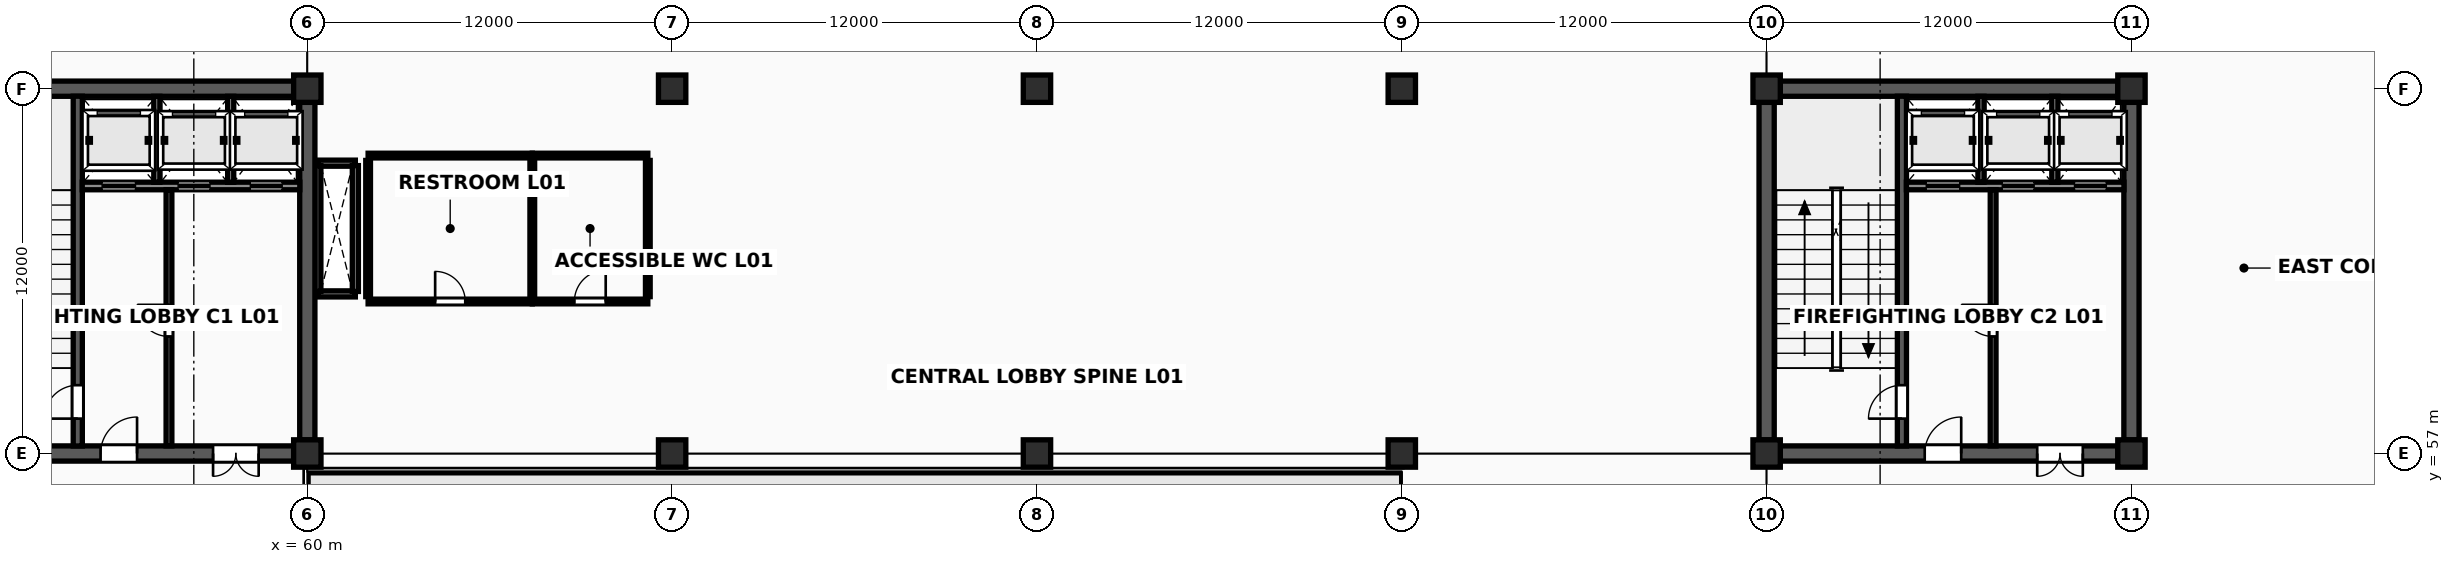
"""IFC4 building model, lengths in metres.
Left out: names, types, materials, properties, quantities, classifications, styles, units other than length and angle.
Written with IfcOpenShell. Run it as: python <this file> out.ifc"""

import sys

from ifc_helpers import new_model, si_unit, direction, frame, frame_2d, origin, origin_2d, place, context, subcontext, project, spatial, rectangle, extrude, element, fill, save


model = new_model("IFC4")
c1 = context("Model", 3, precision=1e-05, world=origin(), true_north=direction((0.0, 1.0)))
c2 = subcontext(c1, "Body", "Model", "MODEL_VIEW")
j1 = project(units=[si_unit("LENGTHUNIT", "METRE"), si_unit("PLANEANGLEUNIT", "RADIAN")], contexts=[c1])
p1 = place(None, origin())
s1 = spatial("IfcSite", under=j1, at=p1, CompositionType="ELEMENT")
p2 = place(p1, origin())
s2 = spatial("IfcBuilding", under=s1, at=p2, CompositionType="ELEMENT")
p3 = place(p2, frame((0.0, 0.0, 5.4)))
s3 = spatial("IfcBuildingStorey", under=s2, at=p3, CompositionType="ELEMENT", Elevation=5.4)
for number, where, z_axis, x_axis in (
    (1, (60.0, 57.0, 0.0), (0.0, 0.0, 1.0), (1.0, 0.0, 0.0)),
    (2, (60.0, 69.0, 0.0), (0.0, 0.0, 1.0), (1.0, 0.0, 0.0)),
    (3, (72.0, 57.0, 0.0), (0.0, 0.0, 1.0), (1.0, 0.0, 0.0)),
    (4, (72.0, 69.0, 0.0), (0.0, 0.0, 1.0), (1.0, 0.0, 0.0)),
    (5, (84.0, 57.0, 0.0), (0.0, 0.0, 1.0), (1.0, 0.0, 0.0)),
    (6, (84.0, 69.0, 0.0), (0.0, 0.0, 1.0), (1.0, 0.0, 0.0)),
    (7, (96.0, 57.0, 0.0), (0.0, 0.0, 1.0), (1.0, 0.0, 0.0)),
    (8, (96.0, 69.0, 0.0), (0.0, 0.0, 1.0), (1.0, 0.0, 0.0)),
    (9, (108.0, 57.0, 0.0), (0.0, 0.0, 1.0), (1.0, 0.0, 0.0)),
    (10, (108.0, 69.0, 0.0), (0.0, 0.0, 1.0), (1.0, 0.0, 0.0)),
    (11, (120.0, 57.0, 0.0), (0.0, 0.0, 1.0), (1.0, 0.0, 0.0)),
    (12, (120.0, 69.0, 0.0), (0.0, 0.0, 1.0), (1.0, 0.0, 0.0)),
):
    element("IfcColumn", number, at=place(p3, frame(where, z_axis=z_axis, x_axis=x_axis)), inside=s3, PredefinedType="COLUMN", context=c2, shape_type="SweptSolid", body=[
        extrude(rectangle(XDim=0.9, YDim=0.9, at=origin_2d()), origin(), (0.0, 0.0, 1.0), 4.2),
    ])
for number, where, z_axis, x_axis in (
    (13, (60.347, 62.25, 0.0), (0.0, 0.0, 1.0), (1.0, 0.0, 0.0)),
    (14, (60.347, 66.55, 0.0), (0.0, 0.0, 1.0), (1.0, 0.0, 0.0)),
):
    element("IfcWall", number, at=place(p3, frame(where, z_axis=z_axis, x_axis=x_axis)), inside=s3, PredefinedType="SOLIDWALL", context=c2, shape_type="SweptSolid", body=[
        extrude(rectangle(XDim=1.233, YDim=0.2, at=frame_2d((0.617, 0.0))), origin(), (0.0, 0.0, 1.0), 4.043),
    ])
for number, where, z_axis, x_axis in (
    (15, (60.347, 62.33, 0.0), (0.0, 0.0, 1.0), (0.0, 1.0, 0.0)),
    (16, (61.58, 62.33, 0.0), (0.0, 0.0, 1.0), (0.0, 1.0, 0.0)),
):
    element("IfcWall", number, at=place(p3, frame(where, z_axis=z_axis, x_axis=x_axis)), inside=s3, PredefinedType="SOLIDWALL", context=c2, shape_type="SweptSolid", body=[
        extrude(rectangle(XDim=4.14, YDim=0.2, at=frame_2d((2.07, 0.0))), origin(), (0.0, 0.0, 1.0), 4.043),
    ])
p4 = place(p3, frame((48.447, 57.0, 0.0), z_axis=(0.0, 0.0, 1.0), x_axis=(1.0, 0.0, 0.0)))
e17 = element("IfcWall", 17, at=p4, inside=s3, PredefinedType="SHEAR", context=c2, shape_type="SweptSolid", body=[
    extrude(rectangle(XDim=11.106, YDim=0.5, at=frame_2d((5.553, 0.0))), origin(), (0.0, 0.0, 1.0), 4.043),
])
p5 = place(p4, frame((4.753, 0.0, 0.0)))
e18 = element("IfcOpeningElement", 18, at=p5, cuts=e17, PredefinedType="OPENING", context=c2, shape_type="SweptSolid", body=[
    extrude(rectangle(XDim=1.2, YDim=2.2, at=frame_2d((0.6, 1.1))), frame((0.0, 0.265, 0.0), z_axis=(0.0, -1.0, 0.0), x_axis=(1.0, 0.0, 0.0)), (0.0, 0.0, 1.0), 0.53),
])
p6 = place(p4, frame((8.453, 0.0, 0.0)))
e19 = element("IfcOpeningElement", 19, at=p6, cuts=e17, PredefinedType="OPENING", context=c2, shape_type="SweptSolid", body=[
    extrude(rectangle(XDim=1.5, YDim=2.25, at=frame_2d((0.75, 1.125))), frame((0.0, 0.265, 0.0), z_axis=(0.0, -1.0, 0.0), x_axis=(1.0, 0.0, 0.0)), (0.0, 0.0, 1.0), 0.53),
])
for number, where, z_axis, x_axis in (
    (20, (48.447, 69.0, 0.0), (0.0, 0.0, 1.0), (1.0, 0.0, 0.0)),
    (21, (60.0, 57.447, 0.0), (0.0, 0.0, 1.0), (0.0, 1.0, 0.0)),
):
    element("IfcWall", number, at=place(p3, frame(where, z_axis=z_axis, x_axis=x_axis)), inside=s3, PredefinedType="SHEAR", context=c2, shape_type="SweptSolid", body=[
        extrude(rectangle(XDim=11.106, YDim=0.5, at=frame_2d((5.553, 0.0))), origin(), (0.0, 0.0, 1.0), 4.043),
    ])
p7 = place(p3, frame((52.45, 57.247, 0.0), z_axis=(0.0, 0.0, 1.0), x_axis=(0.0, 1.0, 0.0)))
e22 = element("IfcWall", 22, at=p7, inside=s3, PredefinedType="SHEAR", context=c2, shape_type="SweptSolid", body=[
    extrude(rectangle(XDim=11.506, YDim=0.3, at=frame_2d((5.753, 0.0))), origin(), (0.0, 0.0, 1.0), 4.043),
])
p8 = place(p7, frame((0.9, 0.0, 0.0)))
e23 = element("IfcOpeningElement", 23, at=p8, cuts=e22, PredefinedType="OPENING", context=c2, shape_type="SweptSolid", body=[
    extrude(rectangle(XDim=1.1, YDim=2.2, at=frame_2d((0.55, 1.1))), frame((0.0, 0.165, 0.0), z_axis=(0.0, -1.0, 0.0), x_axis=(1.0, 0.0, 0.0)), (0.0, 0.0, 1.0), 0.33),
])
p9 = place(p3, frame((52.597, 65.8, 0.0), z_axis=(0.0, 0.0, 1.0), x_axis=(1.0, 0.0, 0.0)))
e24 = element("IfcWall", 24, at=p9, inside=s3, PredefinedType="SOLIDWALL", context=c2, shape_type="SweptSolid", body=[
    extrude(rectangle(XDim=7.156, YDim=0.25, at=frame_2d((3.578, 0.0))), origin(), (0.0, 0.0, 1.0), 4.043),
])
p10 = place(p9, frame((0.653, 0.0, 0.0)))
e25 = element("IfcOpeningElement", 25, at=p10, cuts=e24, PredefinedType="OPENING", context=c2, shape_type="SweptSolid", body=[
    extrude(rectangle(XDim=1.1, YDim=2.24, at=frame_2d((0.55, 1.12))), frame((0.0, 0.14, 0.0), z_axis=(0.0, -1.0, 0.0), x_axis=(1.0, 0.0, 0.0)), (0.0, 0.0, 1.0), 0.28),
])
p11 = place(p9, frame((3.153, 0.0, 0.0)))
e26 = element("IfcOpeningElement", 26, at=p11, cuts=e24, PredefinedType="OPENING", context=c2, shape_type="SweptSolid", body=[
    extrude(rectangle(XDim=1.05, YDim=2.2, at=frame_2d((0.525, 1.1))), frame((0.0, 0.14, 0.0), z_axis=(0.0, -1.0, 0.0), x_axis=(1.0, 0.0, 0.0)), (0.0, 0.0, 1.0), 0.28),
])
p12 = place(p9, frame((5.528, 0.0, 0.0)))
e27 = element("IfcOpeningElement", 27, at=p12, cuts=e24, PredefinedType="OPENING", context=c2, shape_type="SweptSolid", body=[
    extrude(rectangle(XDim=1.05, YDim=2.2, at=frame_2d((0.525, 1.1))), frame((0.0, 0.14, 0.0), z_axis=(0.0, -1.0, 0.0), x_axis=(1.0, 0.0, 0.0)), (0.0, 0.0, 1.0), 0.28),
])
for number, where, z_axis, x_axis in (
    (28, (55.05, 65.92, 0.0), (0.0, 0.0, 1.0), (0.0, 1.0, 0.0)),
    (29, (57.48, 65.92, 0.0), (0.0, 0.0, 1.0), (0.0, 1.0, 0.0)),
):
    element("IfcWall", number, at=place(p3, frame(where, z_axis=z_axis, x_axis=x_axis)), inside=s3, PredefinedType="SOLIDWALL", context=c2, shape_type="SweptSolid", body=[
        extrude(rectangle(XDim=2.83, YDim=0.2, at=frame_2d((1.415, 0.0))), origin(), (0.0, 0.0, 1.0), 4.033),
    ])
p13 = place(p3, frame((55.45, 57.25, 0.0), z_axis=(0.0, 0.0, 1.0), x_axis=(0.0, 1.0, 0.0)))
e30 = element("IfcWall", 30, at=p13, inside=s3, PredefinedType="SOLIDWALL", context=c2, shape_type="SweptSolid", body=[
    extrude(rectangle(XDim=8.43, YDim=0.19, at=frame_2d((4.215, 0.0))), origin(), (0.0, 0.0, 1.0), 4.033),
])
p14 = place(p13, frame((3.6, 0.0, 0.0)))
e31 = element("IfcOpeningElement", 31, at=p14, cuts=e30, PredefinedType="OPENING", context=c2, shape_type="SweptSolid", body=[
    extrude(rectangle(XDim=1.04, YDim=2.18, at=frame_2d((0.52, 1.09))), frame((0.0, 0.11, 0.0), z_axis=(0.0, -1.0, 0.0), x_axis=(1.0, 0.0, 0.0)), (0.0, 0.0, 1.0), 0.22),
])
p15 = place(p3, frame((108.447, 57.0, 0.0), z_axis=(0.0, 0.0, 1.0), x_axis=(1.0, 0.0, 0.0)))
e32 = element("IfcWall", 32, at=p15, inside=s3, PredefinedType="SHEAR", context=c2, shape_type="SweptSolid", body=[
    extrude(rectangle(XDim=11.106, YDim=0.5, at=frame_2d((5.553, 0.0))), origin(), (0.0, 0.0, 1.0), 4.043),
])
p16 = place(p15, frame((4.753, 0.0, 0.0)))
e33 = element("IfcOpeningElement", 33, at=p16, cuts=e32, PredefinedType="OPENING", context=c2, shape_type="SweptSolid", body=[
    extrude(rectangle(XDim=1.2, YDim=2.2, at=frame_2d((0.6, 1.1))), frame((0.0, 0.265, 0.0), z_axis=(0.0, -1.0, 0.0), x_axis=(1.0, 0.0, 0.0)), (0.0, 0.0, 1.0), 0.53),
])
p17 = place(p15, frame((8.453, 0.0, 0.0)))
e34 = element("IfcOpeningElement", 34, at=p17, cuts=e32, PredefinedType="OPENING", context=c2, shape_type="SweptSolid", body=[
    extrude(rectangle(XDim=1.5, YDim=2.25, at=frame_2d((0.75, 1.125))), frame((0.0, 0.265, 0.0), z_axis=(0.0, -1.0, 0.0), x_axis=(1.0, 0.0, 0.0)), (0.0, 0.0, 1.0), 0.53),
])
for number, where, z_axis, x_axis in (
    (35, (108.447, 69.0, 0.0), (0.0, 0.0, 1.0), (1.0, 0.0, 0.0)),
    (36, (108.0, 57.447, 0.0), (0.0, 0.0, 1.0), (0.0, 1.0, 0.0)),
    (37, (120.0, 57.447, 0.0), (0.0, 0.0, 1.0), (0.0, 1.0, 0.0)),
):
    element("IfcWall", number, at=place(p3, frame(where, z_axis=z_axis, x_axis=x_axis)), inside=s3, PredefinedType="SHEAR", context=c2, shape_type="SweptSolid", body=[
        extrude(rectangle(XDim=11.106, YDim=0.5, at=frame_2d((5.553, 0.0))), origin(), (0.0, 0.0, 1.0), 4.043),
    ])
p18 = place(p3, frame((112.45, 57.247, 0.0), z_axis=(0.0, 0.0, 1.0), x_axis=(0.0, 1.0, 0.0)))
e38 = element("IfcWall", 38, at=p18, inside=s3, PredefinedType="SHEAR", context=c2, shape_type="SweptSolid", body=[
    extrude(rectangle(XDim=11.506, YDim=0.3, at=frame_2d((5.753, 0.0))), origin(), (0.0, 0.0, 1.0), 4.043),
])
p19 = place(p18, frame((0.9, 0.0, 0.0)))
e39 = element("IfcOpeningElement", 39, at=p19, cuts=e38, PredefinedType="OPENING", context=c2, shape_type="SweptSolid", body=[
    extrude(rectangle(XDim=1.1, YDim=2.2, at=frame_2d((0.55, 1.1))), frame((0.0, 0.165, 0.0), z_axis=(0.0, -1.0, 0.0), x_axis=(1.0, 0.0, 0.0)), (0.0, 0.0, 1.0), 0.33),
])
p20 = place(p3, frame((112.597, 65.8, 0.0), z_axis=(0.0, 0.0, 1.0), x_axis=(1.0, 0.0, 0.0)))
e40 = element("IfcWall", 40, at=p20, inside=s3, PredefinedType="SOLIDWALL", context=c2, shape_type="SweptSolid", body=[
    extrude(rectangle(XDim=7.156, YDim=0.25, at=frame_2d((3.578, 0.0))), origin(), (0.0, 0.0, 1.0), 4.043),
])
p21 = place(p20, frame((0.653, 0.0, 0.0)))
e41 = element("IfcOpeningElement", 41, at=p21, cuts=e40, PredefinedType="OPENING", context=c2, shape_type="SweptSolid", body=[
    extrude(rectangle(XDim=1.1, YDim=2.24, at=frame_2d((0.55, 1.12))), frame((0.0, 0.14, 0.0), z_axis=(0.0, -1.0, 0.0), x_axis=(1.0, 0.0, 0.0)), (0.0, 0.0, 1.0), 0.28),
])
p22 = place(p20, frame((3.153, 0.0, 0.0)))
e42 = element("IfcOpeningElement", 42, at=p22, cuts=e40, PredefinedType="OPENING", context=c2, shape_type="SweptSolid", body=[
    extrude(rectangle(XDim=1.05, YDim=2.2, at=frame_2d((0.525, 1.1))), frame((0.0, 0.14, 0.0), z_axis=(0.0, -1.0, 0.0), x_axis=(1.0, 0.0, 0.0)), (0.0, 0.0, 1.0), 0.28),
])
p23 = place(p20, frame((5.528, 0.0, 0.0)))
e43 = element("IfcOpeningElement", 43, at=p23, cuts=e40, PredefinedType="OPENING", context=c2, shape_type="SweptSolid", body=[
    extrude(rectangle(XDim=1.05, YDim=2.2, at=frame_2d((0.525, 1.1))), frame((0.0, 0.14, 0.0), z_axis=(0.0, -1.0, 0.0), x_axis=(1.0, 0.0, 0.0)), (0.0, 0.0, 1.0), 0.28),
])
for number, where, z_axis, x_axis in (
    (44, (115.05, 65.92, 0.0), (0.0, 0.0, 1.0), (0.0, 1.0, 0.0)),
    (45, (117.48, 65.92, 0.0), (0.0, 0.0, 1.0), (0.0, 1.0, 0.0)),
):
    element("IfcWall", number, at=place(p3, frame(where, z_axis=z_axis, x_axis=x_axis)), inside=s3, PredefinedType="SOLIDWALL", context=c2, shape_type="SweptSolid", body=[
        extrude(rectangle(XDim=2.83, YDim=0.2, at=frame_2d((1.415, 0.0))), origin(), (0.0, 0.0, 1.0), 4.033),
    ])
p24 = place(p3, frame((115.45, 57.25, 0.0), z_axis=(0.0, 0.0, 1.0), x_axis=(0.0, 1.0, 0.0)))
e46 = element("IfcWall", 46, at=p24, inside=s3, PredefinedType="SOLIDWALL", context=c2, shape_type="SweptSolid", body=[
    extrude(rectangle(XDim=8.43, YDim=0.19, at=frame_2d((4.215, 0.0))), origin(), (0.0, 0.0, 1.0), 4.033),
])
p25 = place(p24, frame((3.6, 0.0, 0.0)))
e47 = element("IfcOpeningElement", 47, at=p25, cuts=e46, PredefinedType="OPENING", context=c2, shape_type="SweptSolid", body=[
    extrude(rectangle(XDim=1.04, YDim=2.18, at=frame_2d((0.52, 1.09))), frame((0.0, 0.11, 0.0), z_axis=(0.0, -1.0, 0.0), x_axis=(1.0, 0.0, 0.0)), (0.0, 0.0, 1.0), 0.22),
])
p26 = place(p3, frame((62.0, 62.0, 0.0), z_axis=(0.0, 0.0, 1.0), x_axis=(1.0, 0.0, 0.0)))
e48 = element("IfcWall", 48, at=p26, inside=s3, PredefinedType="PLUMBINGWALL", context=c2, shape_type="SweptSolid", body=[
    extrude(rectangle(XDim=5.4, YDim=0.155, at=frame_2d((2.7, 0.0))), origin(), (0.0, 0.0, 1.0), 2.75),
])
p27 = place(p26, frame((2.205, 0.0, 0.0)))
e49 = element("IfcOpeningElement", 49, at=p27, cuts=e48, PredefinedType="OPENING", context=c2, shape_type="SweptSolid", body=[
    extrude(rectangle(XDim=0.99, YDim=2.15, at=frame_2d((0.495, 1.075))), frame((0.0, 0.093, 0.0), z_axis=(0.0, -1.0, 0.0), x_axis=(1.0, 0.0, 0.0)), (0.0, 0.0, 1.0), 0.185),
])
p28 = place(p3, frame((62.0, 66.8, 0.0), z_axis=(0.0, 0.0, 1.0), x_axis=(1.0, 0.0, 0.0)))
e50 = element("IfcWall", 50, at=p28, inside=s3, PredefinedType="PLUMBINGWALL", context=c2, shape_type="SweptSolid", body=[
    extrude(rectangle(XDim=5.4, YDim=0.155, at=frame_2d((2.7, 0.0))), origin(), (0.0, 0.0, 1.0), 2.75),
])
for number, where, z_axis, x_axis in (
    (51, (62.0, 62.16, 0.0), (0.0, 0.0, 1.0), (0.0, 1.0, 0.0)),
    (52, (67.4, 62.16, 0.0), (0.0, 0.0, 1.0), (0.0, 1.0, 0.0)),
):
    element("IfcWall", number, at=place(p3, frame(where, z_axis=z_axis, x_axis=x_axis)), inside=s3, PredefinedType="PLUMBINGWALL", context=c2, shape_type="SweptSolid", body=[
        extrude(rectangle(XDim=4.48, YDim=0.155, at=frame_2d((2.24, 0.0))), origin(), (0.0, 0.0, 1.0), 2.75),
    ])
p29 = place(p3, frame((67.4, 62.0, 0.0), z_axis=(0.0, 0.0, 1.0), x_axis=(1.0, 0.0, 0.0)))
e53 = element("IfcWall", 53, at=p29, inside=s3, PredefinedType="PLUMBINGWALL", context=c2, shape_type="SweptSolid", body=[
    extrude(rectangle(XDim=3.8, YDim=0.155, at=frame_2d((1.9, 0.0))), origin(), (0.0, 0.0, 1.0), 2.75),
])
p30 = place(p29, frame((1.385, 0.0, 0.0)))
e54 = element("IfcOpeningElement", 54, at=p30, cuts=e53, PredefinedType="OPENING", context=c2, shape_type="SweptSolid", body=[
    extrude(rectangle(XDim=1.03, YDim=2.17, at=frame_2d((0.515, 1.085))), frame((0.0, 0.093, 0.0), z_axis=(0.0, -1.0, 0.0), x_axis=(1.0, 0.0, 0.0)), (0.0, 0.0, 1.0), 0.185),
])
p31 = place(p3, frame((67.4, 66.8, 0.0), z_axis=(0.0, 0.0, 1.0), x_axis=(1.0, 0.0, 0.0)))
e55 = element("IfcWall", 55, at=p31, inside=s3, PredefinedType="PLUMBINGWALL", context=c2, shape_type="SweptSolid", body=[
    extrude(rectangle(XDim=3.8, YDim=0.155, at=frame_2d((1.9, 0.0))), origin(), (0.0, 0.0, 1.0), 2.75),
])
p32 = place(p3, frame((71.2, 62.16, 0.0), z_axis=(0.0, 0.0, 1.0), x_axis=(0.0, 1.0, 0.0)))
e56 = element("IfcWall", 56, at=p32, inside=s3, PredefinedType="PLUMBINGWALL", context=c2, shape_type="SweptSolid", body=[
    extrude(rectangle(XDim=4.48, YDim=0.155, at=frame_2d((2.24, 0.0))), origin(), (0.0, 0.0, 1.0), 2.75),
])
p33 = place(p8, origin())
e57 = element("IfcDoor", 57, at=p33, inside=s3, OperationType="SINGLE_SWING_LEFT", PredefinedType="DOOR", context=c2, shape_type="SweptSolid", body=[
    extrude(rectangle(XDim=1.1, YDim=2.2, at=frame_2d((0.55, 1.1))), frame((0.0, 0.025, 0.0), z_axis=(0.0, -1.0, 0.0), x_axis=(1.0, 0.0, 0.0)), (0.0, 0.0, 1.0), 0.05),
])
fill(e23, e57)
p34 = place(p14, origin())
e58 = element("IfcDoor", 58, at=p34, inside=s3, OperationType="SINGLE_SWING_RIGHT", PredefinedType="DOOR", context=c2, shape_type="SweptSolid", body=[
    extrude(rectangle(XDim=1.04, YDim=2.18, at=frame_2d((0.52, 1.09))), frame((0.0, 0.025, 0.0), z_axis=(0.0, -1.0, 0.0), x_axis=(1.0, 0.0, 0.0)), (0.0, 0.0, 1.0), 0.05),
])
fill(e31, e58)
p35 = place(p5, origin())
e59 = element("IfcDoor", 59, at=p35, inside=s3, OperationType="SINGLE_SWING_RIGHT", PredefinedType="DOOR", context=c2, shape_type="SweptSolid", body=[
    extrude(rectangle(XDim=1.2, YDim=2.2, at=frame_2d((0.6, 1.1))), frame((0.0, 0.025, 0.0), z_axis=(0.0, -1.0, 0.0), x_axis=(1.0, 0.0, 0.0)), (0.0, 0.0, 1.0), 0.05),
])
fill(e18, e59)
p36 = place(p6, origin())
e60 = element("IfcDoor", 60, at=p36, inside=s3, OperationType="DOUBLE_DOOR_SINGLE_SWING", PredefinedType="DOOR", context=c2, shape_type="SweptSolid", body=[
    extrude(rectangle(XDim=1.5, YDim=2.25, at=frame_2d((0.75, 1.125))), frame((0.0, 0.025, 0.0), z_axis=(0.0, -1.0, 0.0), x_axis=(1.0, 0.0, 0.0)), (0.0, 0.0, 1.0), 0.05),
])
fill(e19, e60)
p37 = place(p10, origin())
e61 = element("IfcDoor", 61, at=p37, inside=s3, OperationType="SLIDING_TO_LEFT", PredefinedType="USERDEFINED", context=c2, shape_type="SweptSolid", body=[
    extrude(rectangle(XDim=1.1, YDim=2.24, at=frame_2d((0.55, 1.12))), frame((0.0, 0.025, 0.0), z_axis=(0.0, -1.0, 0.0), x_axis=(1.0, 0.0, 0.0)), (0.0, 0.0, 1.0), 0.05),
])
fill(e25, e61)
p38 = place(p11, origin())
e62 = element("IfcDoor", 62, at=p38, inside=s3, OperationType="SLIDING_TO_LEFT", PredefinedType="USERDEFINED", context=c2, shape_type="SweptSolid", body=[
    extrude(rectangle(XDim=1.05, YDim=2.2, at=frame_2d((0.525, 1.1))), frame((0.0, 0.025, 0.0), z_axis=(0.0, -1.0, 0.0), x_axis=(1.0, 0.0, 0.0)), (0.0, 0.0, 1.0), 0.05),
])
fill(e26, e62)
p39 = place(p12, origin())
e63 = element("IfcDoor", 63, at=p39, inside=s3, OperationType="SLIDING_TO_LEFT", PredefinedType="USERDEFINED", context=c2, shape_type="SweptSolid", body=[
    extrude(rectangle(XDim=1.05, YDim=2.2, at=frame_2d((0.525, 1.1))), frame((0.0, 0.025, 0.0), z_axis=(0.0, -1.0, 0.0), x_axis=(1.0, 0.0, 0.0)), (0.0, 0.0, 1.0), 0.05),
])
fill(e27, e63)
p40 = place(p19, origin())
e64 = element("IfcDoor", 64, at=p40, inside=s3, OperationType="SINGLE_SWING_LEFT", PredefinedType="DOOR", context=c2, shape_type="SweptSolid", body=[
    extrude(rectangle(XDim=1.1, YDim=2.2, at=frame_2d((0.55, 1.1))), frame((0.0, 0.025, 0.0), z_axis=(0.0, -1.0, 0.0), x_axis=(1.0, 0.0, 0.0)), (0.0, 0.0, 1.0), 0.05),
])
fill(e39, e64)
p41 = place(p25, origin())
e65 = element("IfcDoor", 65, at=p41, inside=s3, OperationType="SINGLE_SWING_RIGHT", PredefinedType="DOOR", context=c2, shape_type="SweptSolid", body=[
    extrude(rectangle(XDim=1.04, YDim=2.18, at=frame_2d((0.52, 1.09))), frame((0.0, 0.025, 0.0), z_axis=(0.0, -1.0, 0.0), x_axis=(1.0, 0.0, 0.0)), (0.0, 0.0, 1.0), 0.05),
])
fill(e47, e65)
p42 = place(p16, origin())
e66 = element("IfcDoor", 66, at=p42, inside=s3, OperationType="SINGLE_SWING_RIGHT", PredefinedType="DOOR", context=c2, shape_type="SweptSolid", body=[
    extrude(rectangle(XDim=1.2, YDim=2.2, at=frame_2d((0.6, 1.1))), frame((0.0, 0.025, 0.0), z_axis=(0.0, -1.0, 0.0), x_axis=(1.0, 0.0, 0.0)), (0.0, 0.0, 1.0), 0.05),
])
fill(e33, e66)
p43 = place(p17, origin())
e67 = element("IfcDoor", 67, at=p43, inside=s3, OperationType="DOUBLE_DOOR_SINGLE_SWING", PredefinedType="DOOR", context=c2, shape_type="SweptSolid", body=[
    extrude(rectangle(XDim=1.5, YDim=2.25, at=frame_2d((0.75, 1.125))), frame((0.0, 0.025, 0.0), z_axis=(0.0, -1.0, 0.0), x_axis=(1.0, 0.0, 0.0)), (0.0, 0.0, 1.0), 0.05),
])
fill(e34, e67)
p44 = place(p21, origin())
e68 = element("IfcDoor", 68, at=p44, inside=s3, OperationType="SLIDING_TO_LEFT", PredefinedType="USERDEFINED", context=c2, shape_type="SweptSolid", body=[
    extrude(rectangle(XDim=1.1, YDim=2.24, at=frame_2d((0.55, 1.12))), frame((0.0, 0.025, 0.0), z_axis=(0.0, -1.0, 0.0), x_axis=(1.0, 0.0, 0.0)), (0.0, 0.0, 1.0), 0.05),
])
fill(e41, e68)
p45 = place(p22, origin())
e69 = element("IfcDoor", 69, at=p45, inside=s3, OperationType="SLIDING_TO_LEFT", PredefinedType="USERDEFINED", context=c2, shape_type="SweptSolid", body=[
    extrude(rectangle(XDim=1.05, YDim=2.2, at=frame_2d((0.525, 1.1))), frame((0.0, 0.025, 0.0), z_axis=(0.0, -1.0, 0.0), x_axis=(1.0, 0.0, 0.0)), (0.0, 0.0, 1.0), 0.05),
])
fill(e42, e69)
p46 = place(p23, origin())
e70 = element("IfcDoor", 70, at=p46, inside=s3, OperationType="SLIDING_TO_LEFT", PredefinedType="USERDEFINED", context=c2, shape_type="SweptSolid", body=[
    extrude(rectangle(XDim=1.05, YDim=2.2, at=frame_2d((0.525, 1.1))), frame((0.0, 0.025, 0.0), z_axis=(0.0, -1.0, 0.0), x_axis=(1.0, 0.0, 0.0)), (0.0, 0.0, 1.0), 0.05),
])
fill(e43, e70)
p47 = place(p27, origin())
e71 = element("IfcDoor", 71, at=p47, inside=s3, OperationType="SINGLE_SWING_LEFT", PredefinedType="DOOR", context=c2, shape_type="SweptSolid", body=[
    extrude(rectangle(XDim=0.99, YDim=2.15, at=frame_2d((0.495, 1.075))), frame((0.0, 0.025, 0.0), z_axis=(0.0, -1.0, 0.0), x_axis=(1.0, 0.0, 0.0)), (0.0, 0.0, 1.0), 0.05),
])
fill(e49, e71)
p48 = place(p30, origin())
e72 = element("IfcDoor", 72, at=p48, inside=s3, OperationType="SINGLE_SWING_RIGHT", PredefinedType="DOOR", context=c2, shape_type="SweptSolid", body=[
    extrude(rectangle(XDim=1.03, YDim=2.17, at=frame_2d((0.515, 1.085))), frame((0.0, 0.025, 0.0), z_axis=(0.0, -1.0, 0.0), x_axis=(1.0, 0.0, 0.0)), (0.0, 0.0, 1.0), 0.05),
])
fill(e54, e72)
save(model, sys.argv[1])
